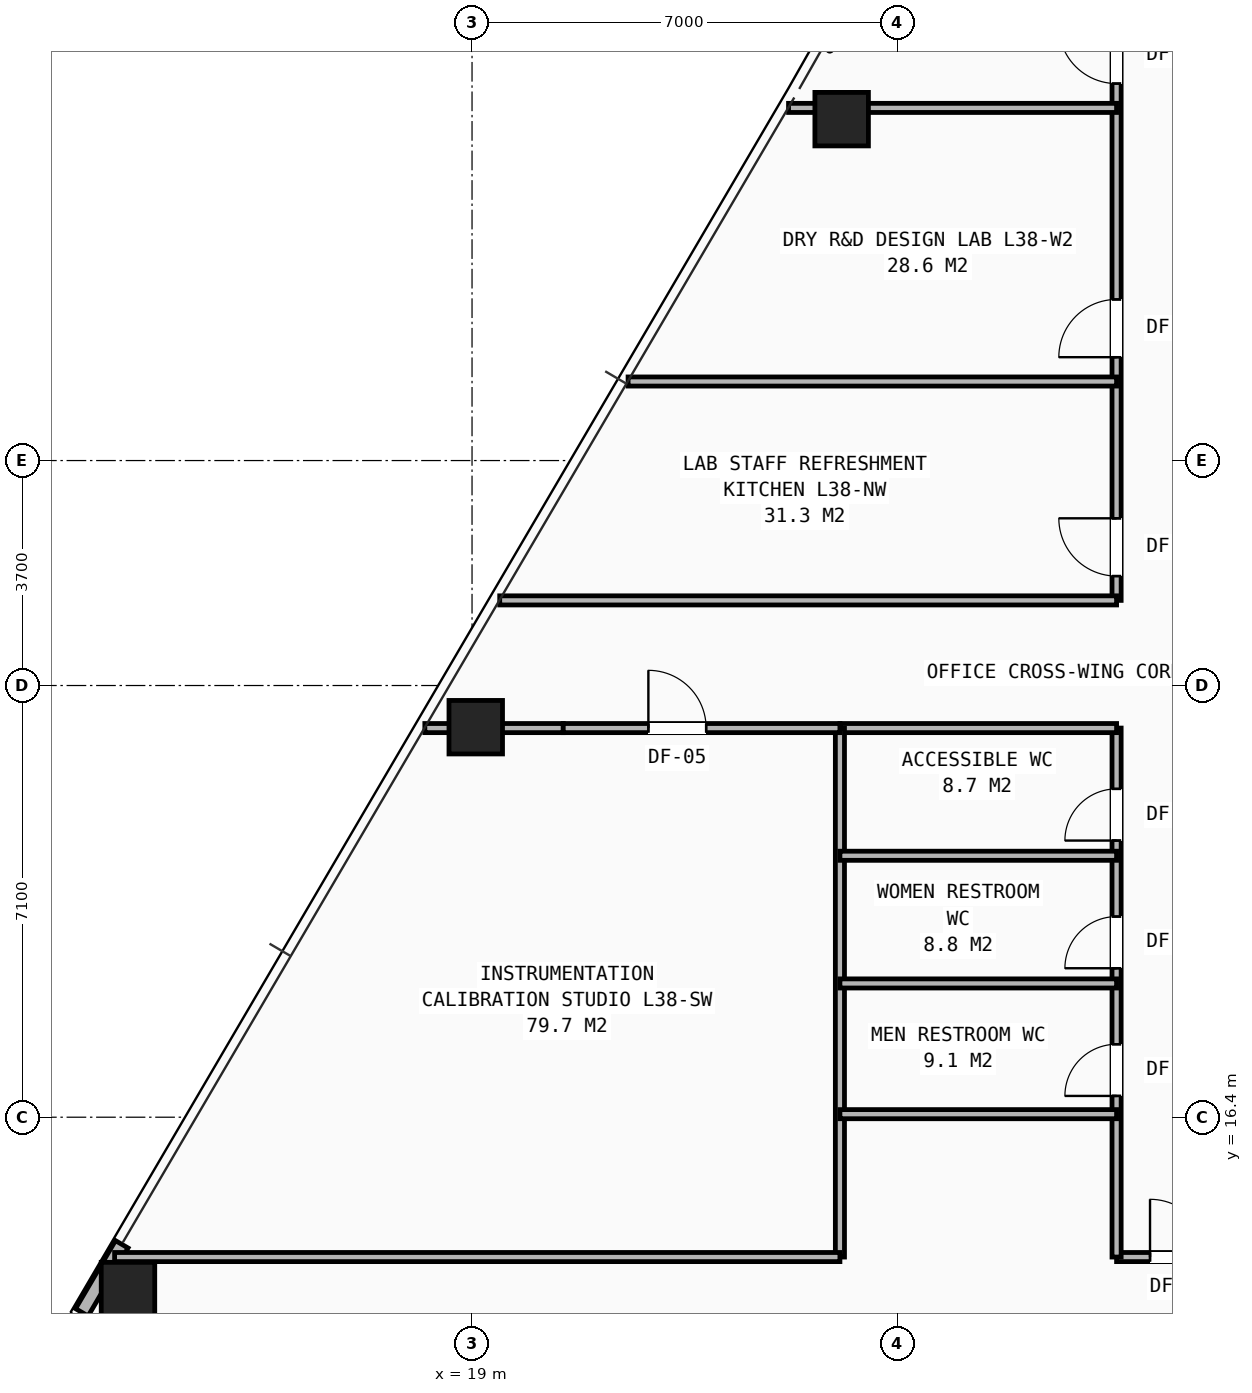
"""IFC4 building model, lengths in metres.
Left out: names, types, materials, properties, quantities, classifications, styles, units other than length and angle.
Written with IfcOpenShell. Run it as: python <this file> out.ifc"""

import sys

from ifc_helpers import new_model, si_unit, direction, frame, frame_2d, origin, origin_2d, place, context, subcontext, project, spatial, rectangle, hollow_rectangle, extrude, element, fill, save


model = new_model("IFC4")
c1 = context("Model", 3, precision=1e-05, world=origin(), true_north=direction((0.0, 1.0)))
c2 = subcontext(c1, "Body", "Model", "MODEL_VIEW")
j1 = project(units=[si_unit("LENGTHUNIT", "METRE"), si_unit("PLANEANGLEUNIT", "RADIAN")], contexts=[c1])
p1 = place(None, origin())
s1 = spatial("IfcSite", under=j1, at=p1, CompositionType="ELEMENT")
p2 = place(p1, origin())
s2 = spatial("IfcBuilding", under=s1, at=p2, CompositionType="ELEMENT")
p3 = place(p2, frame((0.0, 0.0, 133.25)))
s3 = spatial("IfcBuildingStorey", under=s2, at=p3, CompositionType="ELEMENT", Elevation=133.25)
for number, where, z_axis, x_axis in (
    (1, (25.079, 32.815, 0.0), (0.0, 0.0, 1.0), (1.0, 0.0, 0.0)),
    (2, (19.061, 22.814, 0.0), (0.0, 0.0, 1.0), (1.0, 0.0, 0.0)),
    (3, (13.342, 13.573, 0.0), (0.0, 0.0, 1.0), (1.0, 0.0, 0.0)),
):
    element("IfcColumn", number, at=place(p3, frame(where, z_axis=z_axis, x_axis=x_axis)), inside=s3, PredefinedType="COLUMN", context=c2, shape_type="SweptSolid", body=[
        extrude(hollow_rectangle(XDim=0.88, YDim=0.88, WallThickness=0.06, at=origin_2d()), origin(), (0.0, 0.0, 1.0), 3.45),
    ])
p4 = place(p3, frame((13.239, 14.31, 0.0), z_axis=(0.0, 0.0, 1.0), x_axis=(-0.50575330013, -0.86267815517, 0.0)))
e4 = element("IfcWall", 4, at=p4, inside=s3, PredefinedType="SHEAR", context=c2, shape_type="SweptSolid", body=[
    extrude(rectangle(XDim=1.298, YDim=0.24, at=frame_2d((0.649, 0.0))), origin(), (0.0, 0.0, 1.0), 2.583),
])
p5 = place(p3, frame((29.6, 14.1, 0.0), z_axis=(0.0, 0.0, 1.0), x_axis=(1.0, 0.0, 0.0)))
e5 = element("IfcWall", 5, at=p5, inside=s3, PredefinedType="PARTITIONING", context=c2, shape_type="SweptSolid", body=[
    extrude(rectangle(XDim=18.6, YDim=0.15, at=frame_2d((9.3, 0.0))), origin(), (0.0, 0.0, 1.0), 2.252),
])
p6 = place(p5, frame((0.55, 0.0, 0.0)))
e6 = element("IfcOpeningElement", 6, at=p6, cuts=e5, PredefinedType="OPENING", context=c2, shape_type="SweptSolid", body=[
    extrude(rectangle(XDim=0.95, YDim=2.1, at=frame_2d((0.475, 1.05))), frame((0.0, 0.085, 0.0), z_axis=(0.0, -1.0, 0.0), x_axis=(1.0, 0.0, 0.0)), (0.0, 0.0, 1.0), 0.17),
])
p7 = place(p5, frame((2.55, 0.0, 0.0)))
e7 = element("IfcOpeningElement", 7, at=p7, cuts=e5, PredefinedType="OPENING", context=c2, shape_type="SweptSolid", body=[
    extrude(rectangle(XDim=0.95, YDim=2.1, at=frame_2d((0.475, 1.05))), frame((0.0, 0.085, 0.0), z_axis=(0.0, -1.0, 0.0), x_axis=(1.0, 0.0, 0.0)), (0.0, 0.0, 1.0), 0.17),
])
p8 = place(p5, frame((6.75, 0.0, 0.0)))
e8 = element("IfcOpeningElement", 8, at=p8, cuts=e5, PredefinedType="OPENING", context=c2, shape_type="SweptSolid", body=[
    extrude(rectangle(XDim=0.95, YDim=2.1, at=frame_2d((0.475, 1.05))), frame((0.0, 0.085, 0.0), z_axis=(0.0, -1.0, 0.0), x_axis=(1.0, 0.0, 0.0)), (0.0, 0.0, 1.0), 0.17),
])
p9 = place(p5, frame((10.95, 0.0, 0.0)))
e9 = element("IfcOpeningElement", 9, at=p9, cuts=e5, PredefinedType="OPENING", context=c2, shape_type="SweptSolid", body=[
    extrude(rectangle(XDim=0.95, YDim=2.1, at=frame_2d((0.475, 1.05))), frame((0.0, 0.085, 0.0), z_axis=(0.0, -1.0, 0.0), x_axis=(1.0, 0.0, 0.0)), (0.0, 0.0, 1.0), 0.17),
])
p10 = place(p5, frame((15.15, 0.0, 0.0)))
e10 = element("IfcOpeningElement", 10, at=p10, cuts=e5, PredefinedType="OPENING", context=c2, shape_type="SweptSolid", body=[
    extrude(rectangle(XDim=0.95, YDim=2.1, at=frame_2d((0.475, 1.05))), frame((0.0, 0.085, 0.0), z_axis=(0.0, -1.0, 0.0), x_axis=(1.0, 0.0, 0.0)), (0.0, 0.0, 1.0), 0.17),
])
p11 = place(p3, frame((29.6, 14.1, 0.0), z_axis=(0.0, 0.0, 1.0), x_axis=(0.0, 1.0, 0.0)))
e11 = element("IfcWall", 11, at=p11, inside=s3, PredefinedType="PARTITIONING", context=c2, shape_type="SweptSolid", body=[
    extrude(rectangle(XDim=8.7, YDim=0.15, at=frame_2d((4.35, 0.0))), origin(), (0.0, 0.0, 1.0), 3.21),
])
p12 = place(p11, frame((2.65, 0.0, 0.0)))
e12 = element("IfcOpeningElement", 12, at=p12, cuts=e11, PredefinedType="OPENING", context=c2, shape_type="SweptSolid", body=[
    extrude(rectangle(XDim=0.85, YDim=2.05, at=frame_2d((0.425, 1.025))), frame((0.0, 0.085, 0.0), z_axis=(0.0, -1.0, 0.0), x_axis=(1.0, 0.0, 0.0)), (0.0, 0.0, 1.0), 0.17),
])
p13 = place(p11, frame((4.75, 0.0, 0.0)))
e13 = element("IfcOpeningElement", 13, at=p13, cuts=e11, PredefinedType="OPENING", context=c2, shape_type="SweptSolid", body=[
    extrude(rectangle(XDim=0.85, YDim=2.05, at=frame_2d((0.425, 1.025))), frame((0.0, 0.085, 0.0), z_axis=(0.0, -1.0, 0.0), x_axis=(1.0, 0.0, 0.0)), (0.0, 0.0, 1.0), 0.17),
])
p14 = place(p11, frame((6.85, 0.0, 0.0)))
e14 = element("IfcOpeningElement", 14, at=p14, cuts=e11, PredefinedType="OPENING", context=c2, shape_type="SweptSolid", body=[
    extrude(rectangle(XDim=0.85, YDim=2.05, at=frame_2d((0.425, 1.025))), frame((0.0, 0.085, 0.0), z_axis=(0.0, -1.0, 0.0), x_axis=(1.0, 0.0, 0.0)), (0.0, 0.0, 1.0), 0.17),
])
p15 = place(p3, frame((29.6, 24.9, 0.0), z_axis=(0.0, 0.0, 1.0), x_axis=(0.0, 1.0, 0.0)))
e15 = element("IfcWall", 15, at=p15, inside=s3, PredefinedType="PARTITIONING", context=c2, shape_type="SweptSolid", body=[
    extrude(rectangle(XDim=13.9, YDim=0.15, at=frame_2d((6.95, 0.0))), origin(), (0.0, 0.0, 1.0), 2.252),
])
p16 = place(p15, frame((0.4, 0.0, 0.0)))
e16 = element("IfcOpeningElement", 16, at=p16, cuts=e15, PredefinedType="OPENING", context=c2, shape_type="SweptSolid", body=[
    extrude(rectangle(XDim=0.95, YDim=2.1, at=frame_2d((0.475, 1.05))), frame((0.0, 0.085, 0.0), z_axis=(0.0, -1.0, 0.0), x_axis=(1.0, 0.0, 0.0)), (0.0, 0.0, 1.0), 0.17),
])
p17 = place(p15, frame((4.0, 0.0, 0.0)))
e17 = element("IfcOpeningElement", 17, at=p17, cuts=e15, PredefinedType="OPENING", context=c2, shape_type="SweptSolid", body=[
    extrude(rectangle(XDim=0.95, YDim=2.1, at=frame_2d((0.475, 1.05))), frame((0.0, 0.085, 0.0), z_axis=(0.0, -1.0, 0.0), x_axis=(1.0, 0.0, 0.0)), (0.0, 0.0, 1.0), 0.17),
])
p18 = place(p15, frame((8.5, 0.0, 0.0)))
e18 = element("IfcOpeningElement", 18, at=p18, cuts=e15, PredefinedType="OPENING", context=c2, shape_type="SweptSolid", body=[
    extrude(rectangle(XDim=0.95, YDim=2.1, at=frame_2d((0.475, 1.05))), frame((0.0, 0.085, 0.0), z_axis=(0.0, -1.0, 0.0), x_axis=(1.0, 0.0, 0.0)), (0.0, 0.0, 1.0), 0.17),
])
p19 = place(p3, frame((18.224, 22.8, 0.0), z_axis=(0.0, 0.0, 1.0), x_axis=(1.0, 0.0, 0.0)))
e19 = element("IfcWall", 19, at=p19, inside=s3, PredefinedType="PARTITIONING", context=c2, shape_type="SweptSolid", body=[
    extrude(rectangle(XDim=2.276, YDim=0.15, at=frame_2d((1.138, 0.0))), origin(), (0.0, 0.0, 1.0), 2.589),
])
p20 = place(p3, frame((25.05, 22.8, 0.0), z_axis=(0.0, 0.0, 1.0), x_axis=(1.0, 0.0, 0.0)))
e20 = element("IfcWall", 20, at=p20, inside=s3, PredefinedType="PARTITIONING", context=c2, shape_type="SweptSolid", body=[
    extrude(rectangle(XDim=4.55, YDim=0.15, at=frame_2d((2.275, 0.0))), origin(), (0.0, 0.0, 1.0), 3.21),
])
p21 = place(p3, frame((19.455, 24.9, 0.0), z_axis=(0.0, 0.0, 1.0), x_axis=(1.0, 0.0, 0.0)))
e21 = element("IfcWall", 21, at=p21, inside=s3, PredefinedType="PARTITIONING", context=c2, shape_type="SweptSolid", body=[
    extrude(rectangle(XDim=10.145, YDim=0.15, at=frame_2d((5.073, 0.0))), origin(), (0.0, 0.0, 1.0), 2.589),
])
p22 = place(p3, frame((25.05, 14.1, 0.0), z_axis=(0.0, 0.0, 1.0), x_axis=(0.0, 1.0, 0.0)))
e22 = element("IfcWall", 22, at=p22, inside=s3, PredefinedType="PARTITIONING", context=c2, shape_type="SweptSolid", body=[
    extrude(rectangle(XDim=8.7, YDim=0.15, at=frame_2d((4.35, 0.0))), origin(), (0.0, 0.0, 1.0), 3.21),
])
for number, where, z_axis, x_axis in (
    (23, (25.05, 16.45, 0.0), (0.0, 0.0, 1.0), (1.0, 0.0, 0.0)),
    (24, (25.05, 18.6, 0.0), (0.0, 0.0, 1.0), (1.0, 0.0, 0.0)),
    (25, (25.05, 20.7, 0.0), (0.0, 0.0, 1.0), (1.0, 0.0, 0.0)),
):
    element("IfcWall", number, at=place(p3, frame(where, z_axis=z_axis, x_axis=x_axis)), inside=s3, PredefinedType="PARTITIONING", context=c2, shape_type="SweptSolid", body=[
        extrude(rectangle(XDim=4.55, YDim=0.15, at=frame_2d((2.275, 0.0))), origin(), (0.0, 0.0, 1.0), 3.21),
    ])
p23 = place(p3, frame((13.122, 14.1, 0.0), z_axis=(0.0, 0.0, 1.0), x_axis=(1.0, 0.0, 0.0)))
e26 = element("IfcWall", 26, at=p23, inside=s3, PredefinedType="PARTITIONING", context=c2, shape_type="SweptSolid", body=[
    extrude(rectangle(XDim=11.928, YDim=0.15, at=frame_2d((5.964, 0.0))), origin(), (0.0, 0.0, 1.0), 2.589),
])
p24 = place(p3, frame((20.5, 22.8, 0.0), z_axis=(0.0, 0.0, 1.0), x_axis=(1.0, 0.0, 0.0)))
e27 = element("IfcWall", 27, at=p24, inside=s3, PredefinedType="PARTITIONING", context=c2, shape_type="SweptSolid", body=[
    extrude(rectangle(XDim=4.55, YDim=0.15, at=frame_2d((2.275, 0.0))), origin(), (0.0, 0.0, 1.0), 3.21),
])
p25 = place(p24, frame((1.4, 0.0, 0.0)))
e28 = element("IfcOpeningElement", 28, at=p25, cuts=e27, PredefinedType="OPENING", context=c2, shape_type="SweptSolid", body=[
    extrude(rectangle(XDim=0.95, YDim=2.1, at=frame_2d((0.475, 1.05))), frame((0.0, 0.085, 0.0), z_axis=(0.0, -1.0, 0.0), x_axis=(1.0, 0.0, 0.0)), (0.0, 0.0, 1.0), 0.17),
])
p26 = place(p3, frame((21.566, 28.5, 0.0), z_axis=(0.0, 0.0, 1.0), x_axis=(1.0, 0.0, 0.0)))
e29 = element("IfcWall", 29, at=p26, inside=s3, PredefinedType="PARTITIONING", context=c2, shape_type="SweptSolid", body=[
    extrude(rectangle(XDim=8.034, YDim=0.15, at=frame_2d((4.017, 0.0))), origin(), (0.0, 0.0, 1.0), 2.589),
])
p27 = place(p3, frame((24.205, 33.0, 0.0), z_axis=(0.0, 0.0, 1.0), x_axis=(1.0, 0.0, 0.0)))
e30 = element("IfcWall", 30, at=p27, inside=s3, PredefinedType="PARTITIONING", context=c2, shape_type="SweptSolid", body=[
    extrude(rectangle(XDim=5.395, YDim=0.15, at=frame_2d((2.697, 0.0))), origin(), (0.0, 0.0, 1.0), 2.252),
])
p28 = place(p12, origin())
e31 = element("IfcDoor", 31, at=p28, inside=s3, OperationType="SINGLE_SWING_LEFT", PredefinedType="DOOR", context=c2, shape_type="SweptSolid", body=[
    extrude(rectangle(XDim=0.85, YDim=2.05, at=frame_2d((0.425, 1.025))), frame((0.0, 0.025, 0.0), z_axis=(0.0, -1.0, 0.0), x_axis=(1.0, 0.0, 0.0)), (0.0, 0.0, 1.0), 0.05),
])
fill(e12, e31)
p29 = place(p13, origin())
e32 = element("IfcDoor", 32, at=p29, inside=s3, OperationType="SINGLE_SWING_LEFT", PredefinedType="DOOR", context=c2, shape_type="SweptSolid", body=[
    extrude(rectangle(XDim=0.85, YDim=2.05, at=frame_2d((0.425, 1.025))), frame((0.0, 0.025, 0.0), z_axis=(0.0, -1.0, 0.0), x_axis=(1.0, 0.0, 0.0)), (0.0, 0.0, 1.0), 0.05),
])
fill(e13, e32)
p30 = place(p14, origin())
e33 = element("IfcDoor", 33, at=p30, inside=s3, OperationType="SINGLE_SWING_LEFT", PredefinedType="DOOR", context=c2, shape_type="SweptSolid", body=[
    extrude(rectangle(XDim=0.85, YDim=2.05, at=frame_2d((0.425, 1.025))), frame((0.0, 0.025, 0.0), z_axis=(0.0, -1.0, 0.0), x_axis=(1.0, 0.0, 0.0)), (0.0, 0.0, 1.0), 0.05),
])
fill(e14, e33)
p31 = place(p6, origin())
e34 = element("IfcDoor", 34, at=p31, inside=s3, OperationType="SINGLE_SWING_LEFT", PredefinedType="DOOR", context=c2, shape_type="SweptSolid", body=[
    extrude(rectangle(XDim=0.95, YDim=2.1, at=frame_2d((0.475, 1.05))), frame((0.0, 0.025, 0.0), z_axis=(0.0, -1.0, 0.0), x_axis=(1.0, 0.0, 0.0)), (0.0, 0.0, 1.0), 0.05),
])
fill(e6, e34)
p32 = place(p25, origin())
e35 = element("IfcDoor", 35, at=p32, inside=s3, OperationType="SINGLE_SWING_LEFT", PredefinedType="DOOR", context=c2, shape_type="SweptSolid", body=[
    extrude(rectangle(XDim=0.95, YDim=2.1, at=frame_2d((0.475, 1.05))), frame((0.0, 0.025, 0.0), z_axis=(0.0, -1.0, 0.0), x_axis=(1.0, 0.0, 0.0)), (0.0, 0.0, 1.0), 0.05),
])
fill(e28, e35)
p33 = place(p16, origin())
e36 = element("IfcDoor", 36, at=p33, inside=s3, OperationType="SINGLE_SWING_RIGHT", PredefinedType="DOOR", context=c2, shape_type="SweptSolid", body=[
    extrude(rectangle(XDim=0.95, YDim=2.1, at=frame_2d((0.475, 1.05))), frame((0.0, 0.025, 0.0), z_axis=(0.0, -1.0, 0.0), x_axis=(1.0, 0.0, 0.0)), (0.0, 0.0, 1.0), 0.05),
])
fill(e16, e36)
p34 = place(p17, origin())
e37 = element("IfcDoor", 37, at=p34, inside=s3, OperationType="SINGLE_SWING_LEFT", PredefinedType="DOOR", context=c2, shape_type="SweptSolid", body=[
    extrude(rectangle(XDim=0.95, YDim=2.1, at=frame_2d((0.475, 1.05))), frame((0.0, 0.025, 0.0), z_axis=(0.0, -1.0, 0.0), x_axis=(1.0, 0.0, 0.0)), (0.0, 0.0, 1.0), 0.05),
])
fill(e17, e37)
p35 = place(p18, origin())
e38 = element("IfcDoor", 38, at=p35, inside=s3, OperationType="SINGLE_SWING_RIGHT", PredefinedType="DOOR", context=c2, shape_type="SweptSolid", body=[
    extrude(rectangle(XDim=0.95, YDim=2.1, at=frame_2d((0.475, 1.05))), frame((0.0, 0.025, 0.0), z_axis=(0.0, -1.0, 0.0), x_axis=(1.0, 0.0, 0.0)), (0.0, 0.0, 1.0), 0.05),
])
fill(e18, e38)
save(model, sys.argv[1])
